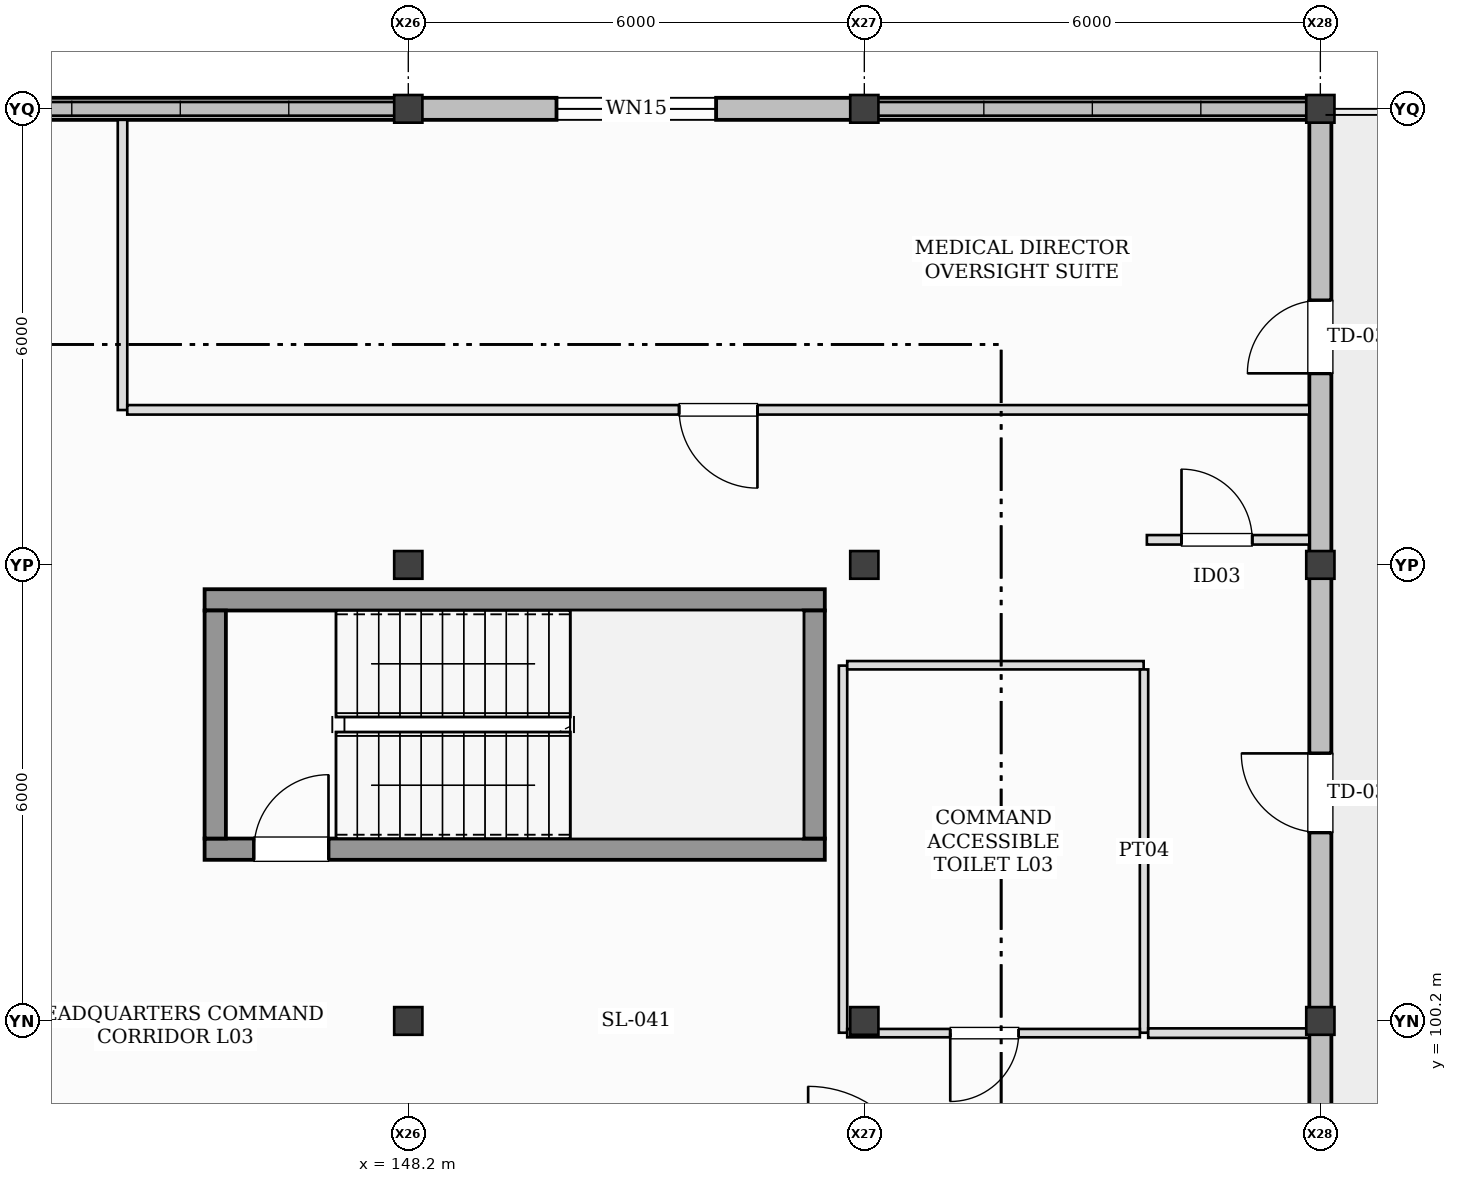
"""IFC4 building model, lengths in metres.
Left out: names, types, materials, properties, quantities, classifications, styles, units other than length and angle.
Written with IfcOpenShell. Run it as: python <this file> out.ifc"""

import sys

from ifc_helpers import new_model, si_unit, direction, frame, frame_2d, origin, origin_2d, place, context, subcontext, project, spatial, rectangle, i_section, extrude, element, fill, save


model = new_model("IFC4")
c1 = context("Model", 3, precision=1e-05, world=origin(), true_north=direction((0.0, 1.0)))
c2 = subcontext(c1, "Body", "Model", "MODEL_VIEW")
j1 = project(units=[si_unit("LENGTHUNIT", "METRE"), si_unit("PLANEANGLEUNIT", "RADIAN")], contexts=[c1])
p1 = place(None, origin())
s1 = spatial("IfcSite", under=j1, at=p1, CompositionType="ELEMENT")
p2 = place(p1, origin())
s2 = spatial("IfcBuilding", under=s1, at=p2, CompositionType="ELEMENT")
p3 = place(p2, frame((0.0, 0.0, 10.0)))
s3 = spatial("IfcBuildingStorey", under=s2, at=p3, CompositionType="ELEMENT", Elevation=10.0)
for number, where, z_axis, x_axis in (
    (1, (148.2, 100.2, 0.0), (0.0, 0.0, 1.0), (1.0, 0.0, 0.0)),
    (2, (148.2, 106.2, 0.0), (0.0, 0.0, 1.0), (1.0, 0.0, 0.0)),
    (3, (148.2, 112.2, 0.0), (0.0, 0.0, 1.0), (1.0, 0.0, 0.0)),
    (4, (154.2, 100.2, 0.0), (0.0, 0.0, 1.0), (1.0, 0.0, 0.0)),
    (5, (154.2, 106.2, 0.0), (0.0, 0.0, 1.0), (1.0, 0.0, 0.0)),
    (6, (154.2, 112.2, 0.0), (0.0, 0.0, 1.0), (1.0, 0.0, 0.0)),
    (7, (160.2, 100.2, 0.0), (0.0, 0.0, 1.0), (1.0, 0.0, 0.0)),
    (8, (160.2, 106.2, 0.0), (0.0, 0.0, 1.0), (1.0, 0.0, 0.0)),
    (9, (160.2, 112.2, 0.0), (0.0, 0.0, 1.0), (1.0, 0.0, 0.0)),
):
    element("IfcColumn", number, at=place(p3, frame(where, z_axis=z_axis, x_axis=x_axis)), inside=s3, PredefinedType="COLUMN", context=c2, shape_type="SweptSolid", body=[
        extrude(i_section(OverallWidth=0.371, OverallDepth=0.364, WebThickness=0.013, FlangeThickness=0.022, at=origin_2d()), origin(), (0.0, 0.0, 1.0), 4.0),
    ])
p4 = place(p3, frame((148.055, 112.2, 0.0), z_axis=(0.0, 0.0, 1.0), x_axis=(-1.0, 0.0, 0.0)))
e10 = element("IfcWall", 10, at=p4, inside=s3, PredefinedType="STANDARD", context=c2, shape_type="SweptSolid", body=[
    extrude(rectangle(XDim=5.71, YDim=0.29, at=frame_2d((2.855, 0.0))), origin(), (0.0, 0.0, 1.0), 0.68),
])
p5 = place(p3, frame((154.055, 112.2, 0.0), z_axis=(0.0, 0.0, 1.0), x_axis=(-1.0, 0.0, 0.0)))
e11 = element("IfcWall", 11, at=p5, inside=s3, PredefinedType="STANDARD", context=c2, shape_type="SweptSolid", body=[
    extrude(rectangle(XDim=5.71, YDim=0.29, at=frame_2d((2.855, 0.0))), origin(), (0.0, 0.0, 1.0), 3.249),
])
p6 = place(p5, frame((1.805, 0.0, 1.0)))
e12 = element("IfcOpeningElement", 12, at=p6, cuts=e11, PredefinedType="OPENING", context=c2, shape_type="SweptSolid", body=[
    extrude(rectangle(XDim=2.1, YDim=1.55, at=frame_2d((1.05, 0.775))), frame((0.0, 0.155, 0.0), z_axis=(0.0, -1.0, 0.0), x_axis=(1.0, 0.0, 0.0)), (0.0, 0.0, 1.0), 0.31),
])
p7 = place(p3, frame((160.055, 112.2, 0.0), z_axis=(0.0, 0.0, 1.0), x_axis=(-1.0, 0.0, 0.0)))
e13 = element("IfcWall", 13, at=p7, inside=s3, PredefinedType="STANDARD", context=c2, shape_type="SweptSolid", body=[
    extrude(rectangle(XDim=5.71, YDim=0.29, at=frame_2d((2.855, 0.0))), origin(), (0.0, 0.0, 1.0), 0.8),
])
p8 = place(p3, frame((160.2, 94.345, 0.0), z_axis=(0.0, 0.0, 1.0), x_axis=(0.0, 1.0, 0.0)))
e14 = element("IfcWall", 14, at=p8, inside=s3, PredefinedType="STANDARD", context=c2, shape_type="SweptSolid", body=[
    extrude(rectangle(XDim=5.71, YDim=0.29, at=frame_2d((2.855, 0.0))), origin(), (0.0, 0.0, 1.0), 3.303),
])
p9 = place(p8, frame((1.133, 0.0, 0.0)))
e15 = element("IfcOpeningElement", 15, at=p9, cuts=e14, PredefinedType="OPENING", context=c2, shape_type="SweptSolid", body=[
    extrude(rectangle(XDim=1.62, YDim=2.2, at=frame_2d((0.81, 1.1))), frame((0.0, 0.155, 0.0), z_axis=(0.0, -1.0, 0.0), x_axis=(1.0, 0.0, 0.0)), (0.0, 0.0, 1.0), 0.31),
])
p10 = place(p3, frame((160.2, 100.345, 0.0), z_axis=(0.0, 0.0, 1.0), x_axis=(0.0, 1.0, 0.0)))
e16 = element("IfcWall", 16, at=p10, inside=s3, PredefinedType="STANDARD", context=c2, shape_type="SweptSolid", body=[
    extrude(rectangle(XDim=5.71, YDim=0.29, at=frame_2d((2.855, 0.0))), origin(), (0.0, 0.0, 1.0), 3.303),
])
p11 = place(p10, frame((2.335, 0.0, 0.0)))
e17 = element("IfcOpeningElement", 17, at=p11, cuts=e16, PredefinedType="OPENING", context=c2, shape_type="SweptSolid", body=[
    extrude(rectangle(XDim=1.04, YDim=2.16, at=frame_2d((0.52, 1.08))), frame((0.0, 0.155, 0.0), z_axis=(0.0, -1.0, 0.0), x_axis=(1.0, 0.0, 0.0)), (0.0, 0.0, 1.0), 0.31),
])
p12 = place(p3, frame((160.2, 106.345, 0.0), z_axis=(0.0, 0.0, 1.0), x_axis=(0.0, 1.0, 0.0)))
e18 = element("IfcWall", 18, at=p12, inside=s3, PredefinedType="STANDARD", context=c2, shape_type="SweptSolid", body=[
    extrude(rectangle(XDim=5.71, YDim=0.29, at=frame_2d((2.855, 0.0))), origin(), (0.0, 0.0, 1.0), 3.303),
])
p13 = place(p12, frame((2.375, 0.0, 0.0)))
e19 = element("IfcOpeningElement", 19, at=p13, cuts=e18, PredefinedType="OPENING", context=c2, shape_type="SweptSolid", body=[
    extrude(rectangle(XDim=0.96, YDim=2.14, at=frame_2d((0.48, 1.07))), frame((0.0, 0.155, 0.0), z_axis=(0.0, -1.0, 0.0), x_axis=(1.0, 0.0, 0.0)), (0.0, 0.0, 1.0), 0.31),
])
p14 = place(p3, frame((145.52, 102.46, 0.0), z_axis=(0.0, 0.0, 1.0), x_axis=(1.0, 0.0, 0.0)))
e20 = element("IfcWall", 20, at=p14, inside=s3, PredefinedType="SHEAR", context=c2, shape_type="SweptSolid", body=[
    extrude(rectangle(XDim=8.16, YDim=0.28, at=frame_2d((4.08, 0.0))), origin(), (0.0, 0.0, 1.0), 4.0),
])
p15 = place(p14, frame((0.65, 0.0, 0.0)))
e21 = element("IfcOpeningElement", 21, at=p15, cuts=e20, PredefinedType="OPENING", context=c2, shape_type="SweptSolid", body=[
    extrude(rectangle(XDim=0.98, YDim=2.15, at=frame_2d((0.49, 1.075))), frame((0.0, 0.15, 0.0), z_axis=(0.0, -1.0, 0.0), x_axis=(1.0, 0.0, 0.0)), (0.0, 0.0, 1.0), 0.3),
])
p16 = place(p3, frame((153.68, 105.74, 0.0), z_axis=(0.0, 0.0, 1.0), x_axis=(-1.0, 0.0, 0.0)))
e22 = element("IfcWall", 22, at=p16, inside=s3, PredefinedType="SHEAR", context=c2, shape_type="SweptSolid", body=[
    extrude(rectangle(XDim=8.16, YDim=0.28, at=frame_2d((4.08, 0.0))), origin(), (0.0, 0.0, 1.0), 4.0),
])
for number, where, z_axis, x_axis in (
    (23, (145.66, 105.6, 0.0), (0.0, 0.0, 1.0), (0.0, -1.0, 0.0)),
    (24, (153.54, 102.6, 0.0), (0.0, 0.0, 1.0), (0.0, 1.0, 0.0)),
):
    element("IfcWall", number, at=place(p3, frame(where, z_axis=z_axis, x_axis=x_axis)), inside=s3, PredefinedType="SHEAR", context=c2, shape_type="SweptSolid", body=[
        extrude(rectangle(XDim=3.0, YDim=0.28, at=frame_2d((1.5, 0.0))), origin(), (0.0, 0.0, 1.0), 4.0),
    ])
p17 = place(p3, frame((144.44, 108.238, 0.0), z_axis=(0.0, 0.0, 1.0), x_axis=(0.0, 1.0, 0.0)))
e25 = element("IfcWall", 25, at=p17, inside=s3, PredefinedType="PARTITIONING", context=c2, shape_type="SweptSolid", body=[
    extrude(rectangle(XDim=3.817, YDim=0.125, at=frame_2d((1.909, 0.0))), origin(), (0.0, 0.0, 1.0), 3.45),
])
p18 = place(p3, frame((160.055, 108.24, 0.0), z_axis=(0.0, 0.0, 1.0), x_axis=(-1.0, 0.0, 0.0)))
e26 = element("IfcWall", 26, at=p18, inside=s3, PredefinedType="PARTITIONING", context=c2, shape_type="SweptSolid", body=[
    extrude(rectangle(XDim=15.552, YDim=0.125, at=frame_2d((7.776, 0.0))), origin(), (0.0, 0.0, 1.0), 3.74),
])
p19 = place(p18, frame((7.261, 0.0, 0.0)))
e27 = element("IfcOpeningElement", 27, at=p19, cuts=e26, PredefinedType="OPENING", context=c2, shape_type="SweptSolid", body=[
    extrude(rectangle(XDim=1.03, YDim=2.15, at=frame_2d((0.515, 1.075))), frame((0.0, 0.073, 0.0), z_axis=(0.0, -1.0, 0.0), x_axis=(1.0, 0.0, 0.0)), (0.0, 0.0, 1.0), 0.145),
])
p20 = place(p3, frame((153.92, 100.045, 0.0), z_axis=(0.0, 0.0, 1.0), x_axis=(0.0, 1.0, 0.0)))
e28 = element("IfcWall", 28, at=p20, inside=s3, PredefinedType="PARTITIONING", context=c2, shape_type="SweptSolid", body=[
    extrude(rectangle(XDim=4.83, YDim=0.11, at=frame_2d((2.415, 0.0))), origin(), (0.0, 0.0, 1.0), 3.253),
])
p21 = place(p3, frame((153.975, 104.88, 0.0), z_axis=(0.0, 0.0, 1.0), x_axis=(1.0, 0.0, 0.0)))
e29 = element("IfcWall", 29, at=p21, inside=s3, PredefinedType="PARTITIONING", context=c2, shape_type="SweptSolid", body=[
    extrude(rectangle(XDim=3.9, YDim=0.11, at=frame_2d((1.95, 0.0))), origin(), (0.0, 0.0, 1.0), 3.74),
])
p22 = place(p3, frame((157.88, 104.825, 0.0), z_axis=(0.0, 0.0, 1.0), x_axis=(0.0, -1.0, 0.0)))
e30 = element("IfcWall", 30, at=p22, inside=s3, PredefinedType="PARTITIONING", context=c2, shape_type="SweptSolid", body=[
    extrude(rectangle(XDim=4.78, YDim=0.11, at=frame_2d((2.39, 0.0))), origin(), (0.0, 0.0, 1.0), 3.404),
])
p23 = place(p3, frame((157.825, 100.04, 0.0), z_axis=(0.0, 0.0, 1.0), x_axis=(-1.0, 0.0, 0.0)))
e31 = element("IfcWall", 31, at=p23, inside=s3, PredefinedType="PARTITIONING", context=c2, shape_type="SweptSolid", body=[
    extrude(rectangle(XDim=3.85, YDim=0.11, at=frame_2d((1.925, 0.0))), origin(), (0.0, 0.0, 1.0), 3.299),
])
p24 = place(p23, frame((1.594, 0.0, 0.0)))
e32 = element("IfcOpeningElement", 32, at=p24, cuts=e31, PredefinedType="OPENING", context=c2, shape_type="SweptSolid", body=[
    extrude(rectangle(XDim=0.9, YDim=2.1, at=frame_2d((0.45, 1.05))), frame((0.0, 0.065, 0.0), z_axis=(0.0, -1.0, 0.0), x_axis=(1.0, 0.0, 0.0)), (0.0, 0.0, 1.0), 0.13),
])
p25 = place(p3, frame((157.917, 106.53, 0.0), z_axis=(0.0, 0.0, 1.0), x_axis=(1.0, 0.0, 0.0)))
e33 = element("IfcWall", 33, at=p25, inside=s3, PredefinedType="PARTITIONING", context=c2, shape_type="SweptSolid", body=[
    extrude(rectangle(XDim=2.137, YDim=0.125, at=frame_2d((1.069, 0.0))), origin(), (0.0, 0.0, 1.0), 3.299),
])
p26 = place(p25, frame((0.456, 0.0, 0.0)))
e34 = element("IfcOpeningElement", 34, at=p26, cuts=e33, PredefinedType="OPENING", context=c2, shape_type="SweptSolid", body=[
    extrude(rectangle(XDim=0.93, YDim=2.1, at=frame_2d((0.465, 1.05))), frame((0.0, 0.073, 0.0), z_axis=(0.0, -1.0, 0.0), x_axis=(1.0, 0.0, 0.0)), (0.0, 0.0, 1.0), 0.145),
])
p27 = place(p3, frame((160.055, 100.04, 0.0), z_axis=(0.0, 0.0, 1.0), x_axis=(-1.0, 0.0, 0.0)))
e35 = element("IfcWall", 35, at=p27, inside=s3, PredefinedType="PARTITIONING", context=c2, shape_type="SweptSolid", body=[
    extrude(rectangle(XDim=2.12, YDim=0.125, at=frame_2d((1.06, 0.0))), origin(), (0.0, 0.0, 1.0), 3.299),
])
p28 = place(p6, origin())
e36 = element("IfcWindow", 36, at=p28, inside=s3, PartitioningType="SINGLE_PANEL", PredefinedType="WINDOW", context=c2, shape_type="SweptSolid", body=[
    extrude(rectangle(XDim=2.1, YDim=1.55, at=frame_2d((1.05, 0.775))), frame((0.0, 0.03, 0.0), z_axis=(0.0, -1.0, 0.0), x_axis=(1.0, 0.0, 0.0)), (0.0, 0.0, 1.0), 0.06),
])
fill(e12, e36)
p29 = place(p11, frame((1.04, 0.0, 0.0), z_axis=(0.0, 0.0, 1.0), x_axis=(-1.0, 0.0, 0.0)))
e37 = element("IfcDoor", 37, at=p29, inside=s3, OperationType="SINGLE_SWING_RIGHT", PredefinedType="DOOR", context=c2, shape_type="SweptSolid", body=[
    extrude(rectangle(XDim=1.04, YDim=2.16, at=frame_2d((0.52, 1.08))), frame((0.0, 0.025, 0.0), z_axis=(0.0, -1.0, 0.0), x_axis=(1.0, 0.0, 0.0)), (0.0, 0.0, 1.0), 0.05),
])
fill(e17, e37)
p30 = place(p13, frame((0.96, 0.0, 0.0), z_axis=(0.0, 0.0, 1.0), x_axis=(-1.0, 0.0, 0.0)))
e38 = element("IfcDoor", 38, at=p30, inside=s3, OperationType="SINGLE_SWING_LEFT", PredefinedType="DOOR", context=c2, shape_type="SweptSolid", body=[
    extrude(rectangle(XDim=0.96, YDim=2.14, at=frame_2d((0.48, 1.07))), frame((0.0, 0.025, 0.0), z_axis=(0.0, -1.0, 0.0), x_axis=(1.0, 0.0, 0.0)), (0.0, 0.0, 1.0), 0.05),
])
fill(e19, e38)
p31 = place(p15, origin())
e39 = element("IfcDoor", 39, at=p31, inside=s3, OperationType="SINGLE_SWING_RIGHT", PredefinedType="DOOR", context=c2, shape_type="SweptSolid", body=[
    extrude(rectangle(XDim=0.98, YDim=2.15, at=frame_2d((0.49, 1.075))), frame((0.0, 0.025, 0.0), z_axis=(0.0, -1.0, 0.0), x_axis=(1.0, 0.0, 0.0)), (0.0, 0.0, 1.0), 0.05),
])
fill(e21, e39)
p32 = place(p19, frame((1.03, 0.0, 0.0), z_axis=(0.0, 0.0, 1.0), x_axis=(-1.0, 0.0, 0.0)))
e40 = element("IfcDoor", 40, at=p32, inside=s3, OperationType="SINGLE_SWING_LEFT", PredefinedType="DOOR", context=c2, shape_type="SweptSolid", body=[
    extrude(rectangle(XDim=1.03, YDim=2.15, at=frame_2d((0.515, 1.075))), frame((0.0, 0.025, 0.0), z_axis=(0.0, -1.0, 0.0), x_axis=(1.0, 0.0, 0.0)), (0.0, 0.0, 1.0), 0.05),
])
fill(e27, e40)
p33 = place(p24, frame((0.9, 0.0, 0.0), z_axis=(0.0, 0.0, 1.0), x_axis=(-1.0, 0.0, 0.0)))
e41 = element("IfcDoor", 41, at=p33, inside=s3, OperationType="SINGLE_SWING_RIGHT", PredefinedType="DOOR", context=c2, shape_type="SweptSolid", body=[
    extrude(rectangle(XDim=0.9, YDim=2.1, at=frame_2d((0.45, 1.05))), frame((0.0, 0.025, 0.0), z_axis=(0.0, -1.0, 0.0), x_axis=(1.0, 0.0, 0.0)), (0.0, 0.0, 1.0), 0.05),
])
fill(e32, e41)
p34 = place(p26, frame((0.93, 0.0, 0.0), z_axis=(0.0, 0.0, 1.0), x_axis=(-1.0, 0.0, 0.0)))
e42 = element("IfcDoor", 42, at=p34, inside=s3, OperationType="SINGLE_SWING_LEFT", PredefinedType="DOOR", context=c2, shape_type="SweptSolid", body=[
    extrude(rectangle(XDim=0.93, YDim=2.1, at=frame_2d((0.465, 1.05))), frame((0.0, 0.025, 0.0), z_axis=(0.0, -1.0, 0.0), x_axis=(1.0, 0.0, 0.0)), (0.0, 0.0, 1.0), 0.05),
])
fill(e34, e42)
save(model, sys.argv[1])
